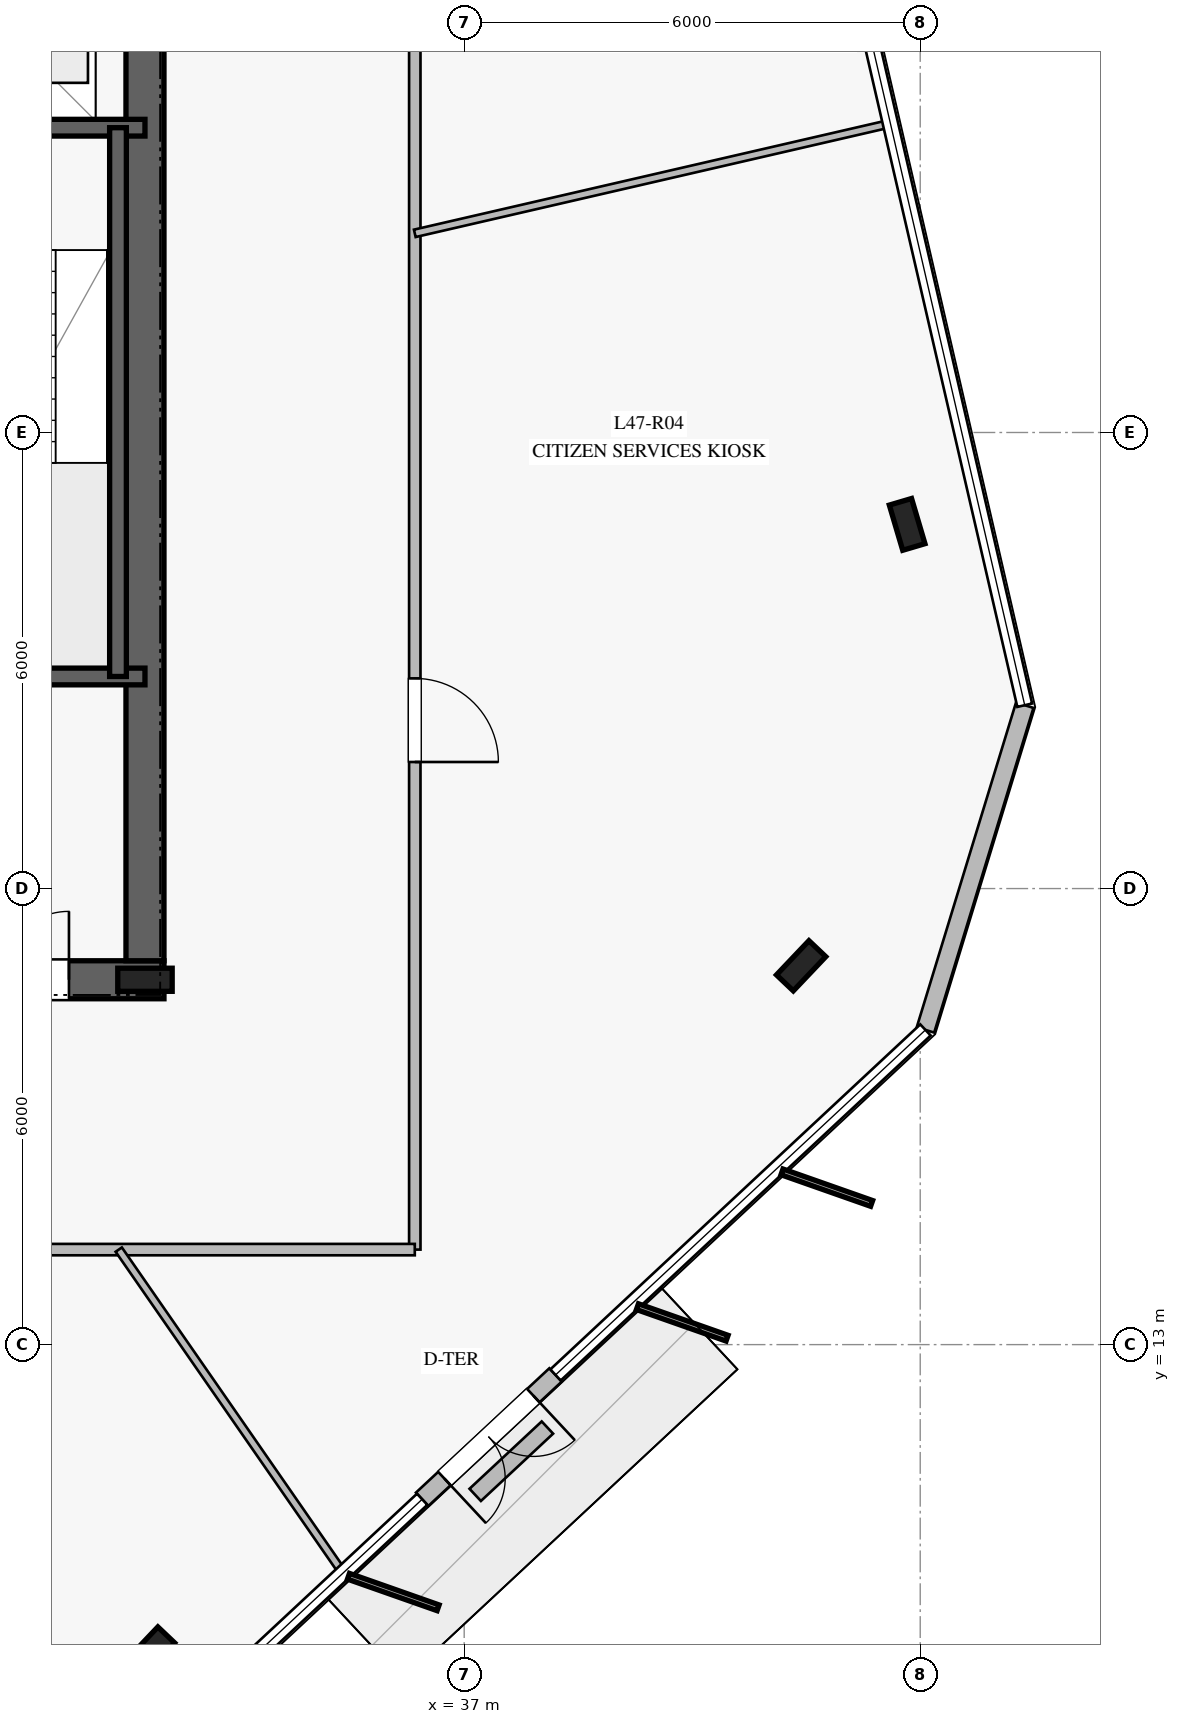
"""IFC4 building model, lengths in metres.
Left out: names, types, materials, properties, quantities, classifications, styles, units other than length and angle.
Written with IfcOpenShell. Run it as: python <this file> out.ifc"""

import sys

from ifc_helpers import new_model, si_unit, direction, frame, frame_2d, origin, origin_2d, place, context, subcontext, project, spatial, rectangle, i_section, extrude, element, fill, save


model = new_model("IFC4")
c1 = context("Model", 3, precision=1e-05, world=origin(), true_north=direction((0.0, 1.0)))
c2 = subcontext(c1, "Body", "Model", "MODEL_VIEW")
j1 = project(units=[si_unit("LENGTHUNIT", "METRE"), si_unit("PLANEANGLEUNIT", "RADIAN")], contexts=[c1])
p1 = place(None, origin())
s1 = spatial("IfcSite", under=j1, at=p1, CompositionType="ELEMENT")
p2 = place(p1, origin())
s2 = spatial("IfcBuilding", under=s1, at=p2, CompositionType="ELEMENT")
p3 = place(p2, frame((0.0, 0.0, 196.8)))
s3 = spatial("IfcBuildingStorey", under=s2, at=p3, CompositionType="ELEMENT", Elevation=196.8)
p4 = place(p3, frame((16.95, 17.8, 0.0), z_axis=(0.0, 0.0, 1.0), x_axis=(1.0, 0.0, 0.0)))
e1 = element("IfcWall", 1, at=p4, inside=s3, PredefinedType="SHEAR", context=c2, shape_type="SweptSolid", body=[
    extrude(rectangle(XDim=16.1, YDim=0.5, at=frame_2d((8.05, 0.0))), origin(), (0.0, 0.0, 1.0), 3.78),
])
p5 = place(p4, frame((5.0, 0.0, 0.0)))
e2 = element("IfcOpeningElement", 2, at=p5, cuts=e1, PredefinedType="OPENING", context=c2, shape_type="SweptSolid", body=[
    extrude(rectangle(XDim=1.2, YDim=2.25, at=frame_2d((0.6, 1.125))), frame((0.0, 0.26, 0.0), z_axis=(0.0, -1.0, 0.0), x_axis=(1.0, 0.0, 0.0)), (0.0, 0.0, 1.0), 0.52),
])
p6 = place(p4, frame((13.95, 0.0, 0.0)))
e3 = element("IfcOpeningElement", 3, at=p6, cuts=e1, PredefinedType="OPENING", context=c2, shape_type="SweptSolid", body=[
    extrude(rectangle(XDim=0.9, YDim=2.1, at=frame_2d((0.45, 1.05))), frame((0.0, 0.26, 0.0), z_axis=(0.0, -1.0, 0.0), x_axis=(1.0, 0.0, 0.0)), (0.0, 0.0, 1.0), 0.52),
])
p7 = place(p4, frame((9.2, 0.0, 0.0)))
e4 = element("IfcOpeningElement", 4, at=p7, cuts=e1, PredefinedType="OPENING", context=c2, shape_type="SweptSolid", body=[
    extrude(rectangle(XDim=1.1, YDim=2.2, at=frame_2d((0.55, 1.1))), frame((0.0, 0.26, 0.0), z_axis=(0.0, -1.0, 0.0), x_axis=(1.0, 0.0, 0.0)), (0.0, 0.0, 1.0), 0.52),
])
p8 = place(p3, frame((32.8, 18.05, 0.0), z_axis=(0.0, 0.0, 1.0), x_axis=(0.0, 1.0, 0.0)))
e5 = element("IfcWall", 5, at=p8, inside=s3, PredefinedType="SHEAR", context=c2, shape_type="SweptSolid", body=[
    extrude(rectangle(XDim=13.9, YDim=0.5, at=frame_2d((6.95, 0.0))), origin(), (0.0, 0.0, 1.0), 3.78),
])
p9 = place(p3, frame((32.8, 17.8, 0.0), z_axis=(0.0, 0.0, 1.0), x_axis=(1.0, 0.0, 0.0)))
e6 = element("IfcColumn", 6, at=p9, inside=s3, PredefinedType="COLUMN", context=c2, shape_type="SweptSolid", body=[
    extrude(i_section(OverallWidth=0.304, OverallDepth=0.716, WebThickness=0.021, FlangeThickness=0.04, at=origin_2d()), origin(), (0.0, 0.0, 1.0), 4.0),
])
for number, where, z_axis, x_axis in (
    (7, (29.08, 21.79, 0.0), (0.0, 0.0, 1.0), (1.0, 0.0, 0.0)),
    (8, (29.08, 29.01, 0.0), (0.0, 0.0, 1.0), (1.0, 0.0, 0.0)),
):
    element("IfcWall", number, at=place(p3, frame(where, z_axis=z_axis, x_axis=x_axis)), inside=s3, PredefinedType="SOLIDWALL", context=c2, shape_type="SweptSolid", body=[
        extrude(rectangle(XDim=3.72, YDim=0.22, at=frame_2d((1.86, 0.0))), origin(), (0.0, 0.0, 1.0), 3.78),
    ])
p10 = place(p3, frame((32.445, 29.01, 0.0), z_axis=(0.0, 0.0, 1.0), x_axis=(0.0, -1.0, 0.0)))
e9 = element("IfcWall", 9, at=p10, inside=s3, PredefinedType="SOLIDWALL", context=c2, shape_type="SweptSolid", body=[
    extrude(rectangle(XDim=7.22, YDim=0.22, at=frame_2d((3.61, 0.0))), origin(), (0.0, 0.0, 1.0), 3.78),
])
for number, where, z_axis, x_axis in (
    (10, (32.867, 8.956, 0.0), (0.0, 0.0, 1.0), (0.688, 0.725, 0.0)),
    (11, (41.433, 17.984, 0.0), (0.0, 0.0, 1.0), (0.688, 0.725, 0.0)),
    (12, (42.828, 23.791, 0.0), (0.0, 0.0, 1.0), (-0.284, 0.959, 0.0)),
):
    element("IfcColumn", number, at=place(p3, frame(where, z_axis=z_axis, x_axis=x_axis)), inside=s3, PredefinedType="COLUMN", context=c2, shape_type="SweptSolid", body=[
        extrude(i_section(OverallWidth=0.305, OverallDepth=0.62, WebThickness=0.021, FlangeThickness=0.04, at=origin_2d()), origin(), (0.0, 0.0, 1.0), 4.0),
    ])
p11 = place(p3, frame((36.447, 10.965, 0.0), z_axis=(0.0, 0.0, 1.0), x_axis=(0.731451066601, 0.681893933958, 0.0)))
e13 = element("IfcWall", 13, at=p11, inside=s3, PredefinedType="STANDARD", context=c2, shape_type="SweptSolid", body=[
    extrude(rectangle(XDim=2.399, YDim=0.24, at=frame_2d((1.2, 0.0))), origin(), (0.0, 0.0, 1.0), 3.78),
])
p12 = place(p11, frame((0.4, 0.0, 0.0)))
e14 = element("IfcOpeningElement", 14, at=p12, cuts=e13, PredefinedType="OPENING", context=c2, shape_type="SweptSolid", body=[
    extrude(rectangle(XDim=1.6, YDim=2.25, at=frame_2d((0.8, 1.125))), frame((0.0, 0.13, 0.0), z_axis=(0.0, -1.0, 0.0), x_axis=(1.0, 0.0, 0.0)), (0.0, 0.0, 1.0), 0.26),
])
p13 = place(p3, frame((43.069, 17.14, 0.0), z_axis=(0.0, 0.0, 1.0), x_axis=(0.29232266577, 0.956319747301, 0.0)))
e15 = element("IfcWall", 15, at=p13, inside=s3, PredefinedType="STANDARD", context=c2, shape_type="SweptSolid", body=[
    extrude(rectangle(XDim=4.467, YDim=0.24, at=frame_2d((2.234, 0.0))), origin(), (0.0, 0.0, 1.0), 3.78),
])
p14 = place(p3, frame((37.145, 11.023, 0.0), z_axis=(0.0, 0.0, 1.0), x_axis=(0.731298971401, 0.682057046315, 0.0)))
e16 = element("IfcWall", 16, at=p14, inside=s3, PredefinedType="USERDEFINED", context=c2, shape_type="SweptSolid", body=[
    extrude(rectangle(XDim=1.299, YDim=0.22, at=frame_2d((0.649, 0.0))), origin(), (0.0, 0.0, 1.0), 0.4),
])
p15 = place(p3, frame((36.35, 35.75, 0.0), z_axis=(0.0, 0.0, 1.0), x_axis=(0.0, -1.0, 0.0)))
e17 = element("IfcWall", 17, at=p15, inside=s3, PredefinedType="PARTITIONING", context=c2, shape_type="SweptSolid", body=[
    extrude(rectangle(XDim=21.5, YDim=0.15, at=frame_2d((10.75, 0.0))), origin(), (0.0, 0.0, 1.0), 3.05),
])
p16 = place(p15, frame((13.985, 0.0, 0.0)))
e18 = element("IfcOpeningElement", 18, at=p16, cuts=e17, PredefinedType="OPENING", context=c2, shape_type="SweptSolid", body=[
    extrude(rectangle(XDim=1.1, YDim=2.2, at=frame_2d((0.55, 1.1))), frame((0.0, 0.085, 0.0), z_axis=(0.0, -1.0, 0.0), x_axis=(1.0, 0.0, 0.0)), (0.0, 0.0, 1.0), 0.17),
])
p17 = place(p15, frame((3.69, 0.0, 0.0)))
e19 = element("IfcOpeningElement", 19, at=p17, cuts=e17, PredefinedType="OPENING", context=c2, shape_type="SweptSolid", body=[
    extrude(rectangle(XDim=1.1, YDim=2.2, at=frame_2d((0.55, 1.1))), frame((0.0, 0.085, 0.0), z_axis=(0.0, -1.0, 0.0), x_axis=(1.0, 0.0, 0.0)), (0.0, 0.0, 1.0), 0.17),
])
p18 = place(p3, frame((36.35, 14.25, 0.0), z_axis=(0.0, 0.0, 1.0), x_axis=(-1.0, 0.0, 0.0)))
e20 = element("IfcWall", 20, at=p18, inside=s3, PredefinedType="PARTITIONING", context=c2, shape_type="SweptSolid", body=[
    extrude(rectangle(XDim=22.7, YDim=0.15, at=frame_2d((11.35, 0.0))), origin(), (0.0, 0.0, 1.0), 3.05),
])
p19 = place(p18, frame((17.857, 0.0, 0.0)))
e21 = element("IfcOpeningElement", 21, at=p19, cuts=e20, PredefinedType="OPENING", context=c2, shape_type="SweptSolid", body=[
    extrude(rectangle(XDim=1.1, YDim=2.2, at=frame_2d((0.55, 1.1))), frame((0.0, 0.085, 0.0), z_axis=(0.0, -1.0, 0.0), x_axis=(1.0, 0.0, 0.0)), (0.0, 0.0, 1.0), 0.17),
])
p20 = place(p18, frame((8.608, 0.0, 0.0)))
e22 = element("IfcOpeningElement", 22, at=p20, cuts=e20, PredefinedType="OPENING", context=c2, shape_type="SweptSolid", body=[
    extrude(rectangle(XDim=1.1, YDim=2.2, at=frame_2d((0.55, 1.1))), frame((0.0, 0.085, 0.0), z_axis=(0.0, -1.0, 0.0), x_axis=(1.0, 0.0, 0.0)), (0.0, 0.0, 1.0), 0.17),
])
p21 = place(p3, frame((32.455, 14.25, 0.0), z_axis=(0.0, 0.0, 1.0), x_axis=(0.569886082616, -0.821723708336, 0.0)))
e23 = element("IfcWall", 23, at=p21, inside=s3, PredefinedType="MOVABLE", context=c2, shape_type="SweptSolid", body=[
    extrude(rectangle(XDim=5.162, YDim=0.1, at=frame_2d((2.581, 0.0))), origin(), (0.0, 0.0, 1.0), 3.05),
])
p22 = place(p3, frame((36.35, 27.62, 0.0), z_axis=(0.0, 0.0, 1.0), x_axis=(0.974375135349, 0.224929090188, 0.0)))
e24 = element("IfcWall", 24, at=p22, inside=s3, PredefinedType="MOVABLE", context=c2, shape_type="SweptSolid", body=[
    extrude(rectangle(XDim=6.406, YDim=0.1, at=frame_2d((3.203, 0.0))), origin(), (0.0, 0.0, 1.0), 3.18),
])
p23 = place(p12, frame((1.6, 0.0, 0.0), z_axis=(0.0, 0.0, 1.0), x_axis=(-1.0, 0.0, 0.0)))
e25 = element("IfcDoor", 25, at=p23, inside=s3, OperationType="DOUBLE_DOOR_SINGLE_SWING", PredefinedType="DOOR", context=c2, shape_type="SweptSolid", body=[
    extrude(rectangle(XDim=1.6, YDim=2.25, at=frame_2d((0.8, 1.125))), frame((0.0, 0.025, 0.0), z_axis=(0.0, -1.0, 0.0), x_axis=(1.0, 0.0, 0.0)), (0.0, 0.0, 1.0), 0.05),
])
fill(e14, e25)
p24 = place(p6, origin())
e26 = element("IfcDoor", 26, at=p24, inside=s3, OperationType="SINGLE_SWING_RIGHT", PredefinedType="DOOR", context=c2, shape_type="SweptSolid", body=[
    extrude(rectangle(XDim=0.9, YDim=2.1, at=frame_2d((0.45, 1.05))), frame((0.0, 0.025, 0.0), z_axis=(0.0, -1.0, 0.0), x_axis=(1.0, 0.0, 0.0)), (0.0, 0.0, 1.0), 0.05),
])
fill(e3, e26)
p25 = place(p16, origin())
e27 = element("IfcDoor", 27, at=p25, inside=s3, OperationType="SINGLE_SWING_RIGHT", PredefinedType="DOOR", context=c2, shape_type="SweptSolid", body=[
    extrude(rectangle(XDim=1.1, YDim=2.2, at=frame_2d((0.55, 1.1))), frame((0.0, 0.025, 0.0), z_axis=(0.0, -1.0, 0.0), x_axis=(1.0, 0.0, 0.0)), (0.0, 0.0, 1.0), 0.05),
])
fill(e18, e27)
save(model, sys.argv[1])
